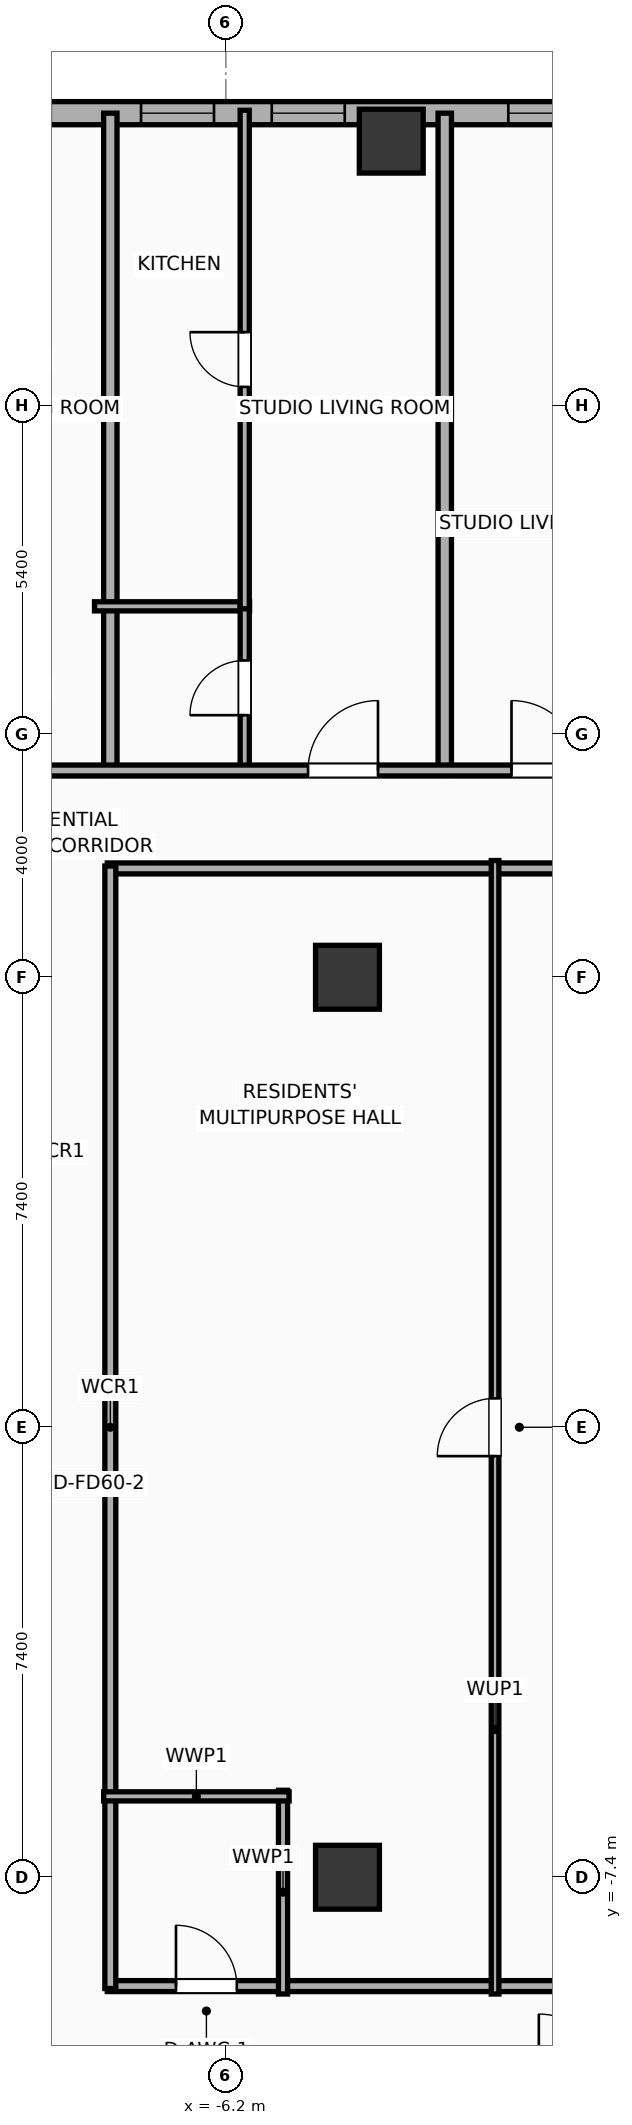
"""IFC4 building model, lengths in metres.
Left out: names, types, materials, properties, quantities, classifications, styles, units other than length and angle.
Written with IfcOpenShell. Run it as: python <this file> out.ifc"""

import sys

from ifc_helpers import new_model, si_unit, direction, frame, frame_2d, origin, origin_2d, place, context, subcontext, project, spatial, rectangle, hollow_rectangle, extrude, element, fill, save


model = new_model("IFC4")
c1 = context("Model", 3, precision=1e-05, world=origin(), true_north=direction((0.0, 1.0)))
c2 = subcontext(c1, "Body", "Model", "MODEL_VIEW")
j1 = project(units=[si_unit("LENGTHUNIT", "METRE"), si_unit("PLANEANGLEUNIT", "RADIAN")], contexts=[c1])
p1 = place(None, origin())
s1 = spatial("IfcSite", under=j1, at=p1, CompositionType="ELEMENT")
p2 = place(p1, origin())
s2 = spatial("IfcBuilding", under=s1, at=p2, CompositionType="ELEMENT")
p3 = place(p2, frame((0.0, 0.0, 109.2)))
s3 = spatial("IfcBuildingStorey", under=s2, at=p3, CompositionType="ELEMENT", Elevation=109.2)
for number, where, z_axis, x_axis in (
    (1, (-4.2, -7.4, 0.0), (0.0, 0.0, 1.0), (1.0, 0.0, 0.0)),
    (2, (-4.2, 7.4, 0.0), (0.0, 0.0, 1.0), (1.0, 0.0, 0.0)),
):
    element("IfcColumn", number, at=place(p3, frame(where, z_axis=z_axis, x_axis=x_axis)), inside=s3, PredefinedType="COLUMN", context=c2, shape_type="SweptSolid", body=[
        extrude(rectangle(XDim=1.05, YDim=1.05, at=origin_2d()), origin(), (0.0, 0.0, 1.0), 3.9),
    ])
p4 = place(p3, frame((-3.48, 21.15, 0.0), z_axis=(0.0, 0.0, 1.0), x_axis=(1.0, 0.0, 0.0)))
e3 = element("IfcColumn", 3, at=p4, inside=s3, PredefinedType="COLUMN", context=c2, shape_type="SweptSolid", body=[
    extrude(hollow_rectangle(XDim=1.05, YDim=1.05, WallThickness=0.036, at=origin_2d()), origin(), (0.0, 0.0, 1.0), 3.9),
])
p5 = place(p3, frame((-25.381, 21.61, 0.0), z_axis=(0.0, 0.0, 1.0), x_axis=(1.0, 0.0, 0.0)))
e4 = element("IfcWall", 4, at=p5, inside=s3, PredefinedType="ELEMENTEDWALL", context=c2, shape_type="SweptSolid", body=[
    extrude(rectangle(XDim=54.763, YDim=0.38, at=frame_2d((27.381, 0.0))), origin(), (0.0, 0.0, 1.0), 3.65),
])
p6 = place(p5, frame((5.645, 0.0, 0.75)))
e5 = element("IfcOpeningElement", 5, at=p6, cuts=e4, PredefinedType="OPENING", context=c2, shape_type="SweptSolid", body=[
    extrude(rectangle(XDim=2.4, YDim=2.1, at=frame_2d((1.2, 1.05))), frame((0.0, 0.2, 0.0), z_axis=(0.0, -1.0, 0.0), x_axis=(1.0, 0.0, 0.0)), (0.0, 0.0, 1.0), 0.4),
])
p7 = place(p5, frame((45.067, 0.0, 0.75)))
e6 = element("IfcOpeningElement", 6, at=p7, cuts=e4, PredefinedType="OPENING", context=c2, shape_type="SweptSolid", body=[
    extrude(rectangle(XDim=2.4, YDim=2.1, at=frame_2d((1.2, 1.05))), frame((0.0, 0.2, 0.0), z_axis=(0.0, -1.0, 0.0), x_axis=(1.0, 0.0, 0.0)), (0.0, 0.0, 1.0), 0.4),
])
p8 = place(p5, frame((1.831, 0.0, 0.75)))
e7 = element("IfcOpeningElement", 7, at=p8, cuts=e4, PredefinedType="OPENING", context=c2, shape_type="SweptSolid", body=[
    extrude(rectangle(XDim=1.2, YDim=2.05, at=frame_2d((0.6, 1.025))), frame((0.0, 0.2, 0.0), z_axis=(0.0, -1.0, 0.0), x_axis=(1.0, 0.0, 0.0)), (0.0, 0.0, 1.0), 0.4),
])
p9 = place(p5, frame((8.996, 0.0, 0.75)))
e8 = element("IfcOpeningElement", 8, at=p9, cuts=e4, PredefinedType="OPENING", context=c2, shape_type="SweptSolid", body=[
    extrude(rectangle(XDim=1.2, YDim=2.05, at=frame_2d((0.6, 1.025))), frame((0.0, 0.2, 0.0), z_axis=(0.0, -1.0, 0.0), x_axis=(1.0, 0.0, 0.0)), (0.0, 0.0, 1.0), 0.4),
])
p10 = place(p5, frame((15.102, 0.0, 0.75)))
e9 = element("IfcOpeningElement", 9, at=p10, cuts=e4, PredefinedType="OPENING", context=c2, shape_type="SweptSolid", body=[
    extrude(rectangle(XDim=1.2, YDim=2.05, at=frame_2d((0.6, 1.025))), frame((0.0, 0.2, 0.0), z_axis=(0.0, -1.0, 0.0), x_axis=(1.0, 0.0, 0.0)), (0.0, 0.0, 1.0), 0.4),
])
p11 = place(p5, frame((12.352, 0.0, 0.75)))
e10 = element("IfcOpeningElement", 10, at=p11, cuts=e4, PredefinedType="OPENING", context=c2, shape_type="SweptSolid", body=[
    extrude(rectangle(XDim=1.2, YDim=2.05, at=frame_2d((0.6, 1.025))), frame((0.0, 0.2, 0.0), z_axis=(0.0, -1.0, 0.0), x_axis=(1.0, 0.0, 0.0)), (0.0, 0.0, 1.0), 0.4),
])
p12 = place(p5, frame((19.936, 0.0, 0.75)))
e11 = element("IfcOpeningElement", 11, at=p12, cuts=e4, PredefinedType="OPENING", context=c2, shape_type="SweptSolid", body=[
    extrude(rectangle(XDim=1.2, YDim=2.05, at=frame_2d((0.6, 1.025))), frame((0.0, 0.2, 0.0), z_axis=(0.0, -1.0, 0.0), x_axis=(1.0, 0.0, 0.0)), (0.0, 0.0, 1.0), 0.4),
])
p13 = place(p5, frame((17.786, 0.0, 0.75)))
e12 = element("IfcOpeningElement", 12, at=p13, cuts=e4, PredefinedType="OPENING", context=c2, shape_type="SweptSolid", body=[
    extrude(rectangle(XDim=1.2, YDim=2.05, at=frame_2d((0.6, 1.025))), frame((0.0, 0.2, 0.0), z_axis=(0.0, -1.0, 0.0), x_axis=(1.0, 0.0, 0.0)), (0.0, 0.0, 1.0), 0.4),
])
p14 = place(p5, frame((23.826, 0.0, 0.75)))
e13 = element("IfcOpeningElement", 13, at=p14, cuts=e4, PredefinedType="OPENING", context=c2, shape_type="SweptSolid", body=[
    extrude(rectangle(XDim=1.2, YDim=2.05, at=frame_2d((0.6, 1.025))), frame((0.0, 0.2, 0.0), z_axis=(0.0, -1.0, 0.0), x_axis=(1.0, 0.0, 0.0)), (0.0, 0.0, 1.0), 0.4),
])
p15 = place(p5, frame((26.576, 0.0, 0.75)))
e14 = element("IfcOpeningElement", 14, at=p15, cuts=e4, PredefinedType="OPENING", context=c2, shape_type="SweptSolid", body=[
    extrude(rectangle(XDim=1.2, YDim=2.05, at=frame_2d((0.6, 1.025))), frame((0.0, 0.2, 0.0), z_axis=(0.0, -1.0, 0.0), x_axis=(1.0, 0.0, 0.0)), (0.0, 0.0, 1.0), 0.4),
])
p16 = place(p5, frame((30.431, 0.0, 0.75)))
e15 = element("IfcOpeningElement", 15, at=p16, cuts=e4, PredefinedType="OPENING", context=c2, shape_type="SweptSolid", body=[
    extrude(rectangle(XDim=1.2, YDim=2.05, at=frame_2d((0.6, 1.025))), frame((0.0, 0.2, 0.0), z_axis=(0.0, -1.0, 0.0), x_axis=(1.0, 0.0, 0.0)), (0.0, 0.0, 1.0), 0.4),
])
p17 = place(p5, frame((38.581, 0.0, 0.75)))
e16 = element("IfcOpeningElement", 16, at=p17, cuts=e4, PredefinedType="OPENING", context=c2, shape_type="SweptSolid", body=[
    extrude(rectangle(XDim=1.2, YDim=2.05, at=frame_2d((0.6, 1.025))), frame((0.0, 0.2, 0.0), z_axis=(0.0, -1.0, 0.0), x_axis=(1.0, 0.0, 0.0)), (0.0, 0.0, 1.0), 0.4),
])
p18 = place(p5, frame((34.786, 0.0, 0.75)))
e17 = element("IfcOpeningElement", 17, at=p18, cuts=e4, PredefinedType="OPENING", context=c2, shape_type="SweptSolid", body=[
    extrude(rectangle(XDim=1.2, YDim=2.05, at=frame_2d((0.6, 1.025))), frame((0.0, 0.2, 0.0), z_axis=(0.0, -1.0, 0.0), x_axis=(1.0, 0.0, 0.0)), (0.0, 0.0, 1.0), 0.4),
])
p19 = place(p5, frame((41.876, 0.0, 0.75)))
e18 = element("IfcOpeningElement", 18, at=p19, cuts=e4, PredefinedType="OPENING", context=c2, shape_type="SweptSolid", body=[
    extrude(rectangle(XDim=1.2, YDim=2.05, at=frame_2d((0.6, 1.025))), frame((0.0, 0.2, 0.0), z_axis=(0.0, -1.0, 0.0), x_axis=(1.0, 0.0, 0.0)), (0.0, 0.0, 1.0), 0.4),
])
p20 = place(p5, frame((49.385, 0.0, 0.75)))
e19 = element("IfcOpeningElement", 19, at=p20, cuts=e4, PredefinedType="OPENING", context=c2, shape_type="SweptSolid", body=[
    extrude(rectangle(XDim=1.2, YDim=2.05, at=frame_2d((0.6, 1.025))), frame((0.0, 0.2, 0.0), z_axis=(0.0, -1.0, 0.0), x_axis=(1.0, 0.0, 0.0)), (0.0, 0.0, 1.0), 0.4),
])
p21 = place(p5, frame((52.181, 0.0, 0.75)))
e20 = element("IfcOpeningElement", 20, at=p21, cuts=e4, PredefinedType="OPENING", context=c2, shape_type="SweptSolid", body=[
    extrude(rectangle(XDim=1.2, YDim=2.05, at=frame_2d((0.6, 1.025))), frame((0.0, 0.2, 0.0), z_axis=(0.0, -1.0, 0.0), x_axis=(1.0, 0.0, 0.0)), (0.0, 0.0, 1.0), 0.4),
])
p22 = place(p3, frame((-8.15, 9.19, 0.0), z_axis=(0.0, 0.0, 1.0), x_axis=(1.0, 0.0, 0.0)))
e21 = element("IfcWall", 21, at=p22, inside=s3, PredefinedType="PARTITIONING", context=c2, shape_type="SweptSolid", body=[
    extrude(rectangle(XDim=16.3, YDim=0.18, at=frame_2d((8.15, 0.0))), origin(), (0.0, 0.0, 1.0), 3.65),
])
p23 = place(p22, frame((8.49, 0.0, 0.0)))
e22 = element("IfcOpeningElement", 22, at=p23, cuts=e21, PredefinedType="OPENING", context=c2, shape_type="SweptSolid", body=[
    extrude(rectangle(XDim=0.95, YDim=2.05, at=frame_2d((0.475, 1.025))), frame((0.0, 0.1, 0.0), z_axis=(0.0, -1.0, 0.0), x_axis=(1.0, 0.0, 0.0)), (0.0, 0.0, 1.0), 0.2),
])
p24 = place(p3, frame((-8.15, -9.19, 0.0), z_axis=(0.0, 0.0, 1.0), x_axis=(1.0, 0.0, 0.0)))
e23 = element("IfcWall", 23, at=p24, inside=s3, PredefinedType="PARTITIONING", context=c2, shape_type="SweptSolid", body=[
    extrude(rectangle(XDim=16.3, YDim=0.18, at=frame_2d((8.15, 0.0))), origin(), (0.0, 0.0, 1.0), 3.65),
])
p25 = place(p24, frame((1.13, 0.0, 0.0)))
e24 = element("IfcOpeningElement", 24, at=p25, cuts=e23, PredefinedType="OPENING", context=c2, shape_type="SweptSolid", body=[
    extrude(rectangle(XDim=1.0, YDim=2.05, at=frame_2d((0.5, 1.025))), frame((0.0, 0.1, 0.0), z_axis=(0.0, -1.0, 0.0), x_axis=(1.0, 0.0, 0.0)), (0.0, 0.0, 1.0), 0.2),
])
p26 = place(p24, frame((10.12, 0.0, 0.0)))
e25 = element("IfcOpeningElement", 25, at=p26, cuts=e23, PredefinedType="OPENING", context=c2, shape_type="SweptSolid", body=[
    extrude(rectangle(XDim=0.95, YDim=2.05, at=frame_2d((0.475, 1.025))), frame((0.0, 0.1, 0.0), z_axis=(0.0, -1.0, 0.0), x_axis=(1.0, 0.0, 0.0)), (0.0, 0.0, 1.0), 0.2),
])
p27 = place(p3, frame((-8.1, -9.23, 0.0), z_axis=(0.0, 0.0, 1.0), x_axis=(0.0, 1.0, 0.0)))
e26 = element("IfcWall", 26, at=p27, inside=s3, PredefinedType="PARTITIONING", context=c2, shape_type="SweptSolid", body=[
    extrude(rectangle(XDim=18.46, YDim=0.18, at=frame_2d((9.23, 0.0))), origin(), (0.0, 0.0, 1.0), 3.65),
])
p28 = place(p3, frame((-5.26, -9.32, 0.0), z_axis=(0.0, 0.0, 1.0), x_axis=(0.0, 1.0, 0.0)))
e27 = element("IfcWall", 27, at=p28, inside=s3, PredefinedType="PLUMBINGWALL", context=c2, shape_type="SweptSolid", body=[
    extrude(rectangle(XDim=3.35, YDim=0.15, at=frame_2d((1.675, 0.0))), origin(), (0.0, 0.0, 1.0), 3.65),
])
p29 = place(p3, frame((-8.21, -6.07, 0.0), z_axis=(0.0, 0.0, 1.0), x_axis=(1.0, 0.0, 0.0)))
e28 = element("IfcWall", 28, at=p29, inside=s3, PredefinedType="PLUMBINGWALL", context=c2, shape_type="SweptSolid", body=[
    extrude(rectangle(XDim=3.05, YDim=0.15, at=frame_2d((1.525, 0.0))), origin(), (0.0, 0.0, 1.0), 3.65),
])
p30 = place(p3, frame((-1.773, -9.32, 0.0), z_axis=(0.0, 0.0, 1.0), x_axis=(0.0, 1.0, 0.0)))
e29 = element("IfcWall", 29, at=p30, inside=s3, PredefinedType="PARTITIONING", context=c2, shape_type="SweptSolid", body=[
    extrude(rectangle(XDim=18.64, YDim=0.125, at=frame_2d((9.32, 0.0))), origin(), (0.0, 0.0, 1.0), 3.65),
])
p31 = place(p30, frame((8.845, 0.0, 0.0)))
e30 = element("IfcOpeningElement", 30, at=p31, cuts=e29, PredefinedType="OPENING", context=c2, shape_type="SweptSolid", body=[
    extrude(rectangle(XDim=0.95, YDim=2.05, at=frame_2d((0.475, 1.025))), frame((0.0, 0.073, 0.0), z_axis=(0.0, -1.0, 0.0), x_axis=(1.0, 0.0, 0.0)), (0.0, 0.0, 1.0), 0.145),
])
p32 = place(p3, frame((-8.1, 10.72, 0.0), z_axis=(0.0, 0.0, 1.0), x_axis=(0.0, 1.0, 0.0)))
e31 = element("IfcWall", 31, at=p32, inside=s3, PredefinedType="PARTITIONING", context=c2, shape_type="SweptSolid", body=[
    extrude(rectangle(XDim=10.89, YDim=0.22, at=frame_2d((5.445, 0.0))), origin(), (0.0, 0.0, 1.0), 3.65),
])
p33 = place(p3, frame((-8.36, 13.5, 0.0), z_axis=(0.0, 0.0, 1.0), x_axis=(1.0, 0.0, 0.0)))
e32 = element("IfcWall", 32, at=p33, inside=s3, PredefinedType="PLUMBINGWALL", context=c2, shape_type="SweptSolid", body=[
    extrude(rectangle(XDim=2.55, YDim=0.15, at=frame_2d((1.275, 0.0))), origin(), (0.0, 0.0, 1.0), 3.65),
])
p34 = place(p3, frame((-5.89, 10.78, 0.0), z_axis=(0.0, 0.0, 1.0), x_axis=(0.0, 1.0, 0.0)))
e33 = element("IfcWall", 33, at=p34, inside=s3, PredefinedType="PLUMBINGWALL", context=c2, shape_type="SweptSolid", body=[
    extrude(rectangle(XDim=2.76, YDim=0.15, at=frame_2d((1.38, 0.0))), origin(), (0.0, 0.0, 1.0), 3.65),
])
p35 = place(p34, frame((0.93, 0.0, 0.0)))
e34 = element("IfcOpeningElement", 34, at=p35, cuts=e33, PredefinedType="OPENING", context=c2, shape_type="SweptSolid", body=[
    extrude(rectangle(XDim=0.9, YDim=2.05, at=frame_2d((0.45, 1.025))), frame((0.0, 0.085, 0.0), z_axis=(0.0, -1.0, 0.0), x_axis=(1.0, 0.0, 0.0)), (0.0, 0.0, 1.0), 0.17),
])
p36 = place(p3, frame((-5.89, 13.46, 0.0), z_axis=(0.0, 0.0, 1.0), x_axis=(0.0, 1.0, 0.0)))
e35 = element("IfcWall", 35, at=p36, inside=s3, PredefinedType="PLUMBINGWALL", context=c2, shape_type="SweptSolid", body=[
    extrude(rectangle(XDim=8.198, YDim=0.15, at=frame_2d((4.099, 0.0))), origin(), (0.0, 0.0, 1.0), 3.65),
])
p37 = place(p36, frame((3.649, 0.0, 0.0)))
e36 = element("IfcOpeningElement", 36, at=p37, cuts=e35, PredefinedType="OPENING", context=c2, shape_type="SweptSolid", body=[
    extrude(rectangle(XDim=0.9, YDim=2.05, at=frame_2d((0.45, 1.025))), frame((0.0, 0.085, 0.0), z_axis=(0.0, -1.0, 0.0), x_axis=(1.0, 0.0, 0.0)), (0.0, 0.0, 1.0), 0.17),
])
p38 = place(p3, frame((-2.6, 10.72, 0.0), z_axis=(0.0, 0.0, 1.0), x_axis=(0.0, 1.0, 0.0)))
e37 = element("IfcWall", 37, at=p38, inside=s3, PredefinedType="PARTITIONING", context=c2, shape_type="SweptSolid", body=[
    extrude(rectangle(XDim=10.89, YDim=0.22, at=frame_2d((5.445, 0.0))), origin(), (0.0, 0.0, 1.0), 3.65),
])
p39 = place(p3, frame((-29.21, 10.8, 0.0), z_axis=(0.0, 0.0, 1.0), x_axis=(1.0, 0.0, 0.0)))
e38 = element("IfcWall", 38, at=p39, inside=s3, PredefinedType="PARTITIONING", context=c2, shape_type="SweptSolid", body=[
    extrude(rectangle(XDim=62.42, YDim=0.18, at=frame_2d((31.21, 0.0))), origin(), (0.0, 0.0, 1.0), 3.65),
])
p40 = place(p39, frame((3.457, 0.0, 0.0)))
e39 = element("IfcOpeningElement", 39, at=p40, cuts=e38, PredefinedType="OPENING", context=c2, shape_type="SweptSolid", body=[
    extrude(rectangle(XDim=1.15, YDim=2.05, at=frame_2d((0.575, 1.025))), frame((0.0, 0.1, 0.0), z_axis=(0.0, -1.0, 0.0), x_axis=(1.0, 0.0, 0.0)), (0.0, 0.0, 1.0), 0.2),
])
p41 = place(p39, frame((11.297, 0.0, 0.0)))
e40 = element("IfcOpeningElement", 40, at=p41, cuts=e38, PredefinedType="OPENING", context=c2, shape_type="SweptSolid", body=[
    extrude(rectangle(XDim=1.15, YDim=2.05, at=frame_2d((0.575, 1.025))), frame((0.0, 0.1, 0.0), z_axis=(0.0, -1.0, 0.0), x_axis=(1.0, 0.0, 0.0)), (0.0, 0.0, 1.0), 0.2),
])
p42 = place(p39, frame((18.925, 0.0, 0.0)))
e41 = element("IfcOpeningElement", 41, at=p42, cuts=e38, PredefinedType="OPENING", context=c2, shape_type="SweptSolid", body=[
    extrude(rectangle(XDim=1.15, YDim=2.05, at=frame_2d((0.575, 1.025))), frame((0.0, 0.1, 0.0), z_axis=(0.0, -1.0, 0.0), x_axis=(1.0, 0.0, 0.0)), (0.0, 0.0, 1.0), 0.2),
])
p43 = place(p39, frame((24.362, 0.0, 0.0)))
e42 = element("IfcOpeningElement", 42, at=p43, cuts=e38, PredefinedType="OPENING", context=c2, shape_type="SweptSolid", body=[
    extrude(rectangle(XDim=1.15, YDim=2.05, at=frame_2d((0.575, 1.025))), frame((0.0, 0.1, 0.0), z_axis=(0.0, -1.0, 0.0), x_axis=(1.0, 0.0, 0.0)), (0.0, 0.0, 1.0), 0.2),
])
p44 = place(p39, frame((27.708, 0.0, 0.0)))
e43 = element("IfcOpeningElement", 43, at=p44, cuts=e38, PredefinedType="OPENING", context=c2, shape_type="SweptSolid", body=[
    extrude(rectangle(XDim=1.15, YDim=2.05, at=frame_2d((0.575, 1.025))), frame((0.0, 0.1, 0.0), z_axis=(0.0, -1.0, 0.0), x_axis=(1.0, 0.0, 0.0)), (0.0, 0.0, 1.0), 0.2),
])
p45 = place(p39, frame((34.618, 0.0, 0.0)))
e44 = element("IfcOpeningElement", 44, at=p45, cuts=e38, PredefinedType="OPENING", context=c2, shape_type="SweptSolid", body=[
    extrude(rectangle(XDim=0.9, YDim=2.05, at=frame_2d((0.45, 1.025))), frame((0.0, 0.1, 0.0), z_axis=(0.0, -1.0, 0.0), x_axis=(1.0, 0.0, 0.0)), (0.0, 0.0, 1.0), 0.2),
])
p46 = place(p39, frame((43.106, 0.0, 0.0)))
e45 = element("IfcOpeningElement", 45, at=p46, cuts=e38, PredefinedType="OPENING", context=c2, shape_type="SweptSolid", body=[
    extrude(rectangle(XDim=1.15, YDim=2.05, at=frame_2d((0.575, 1.025))), frame((0.0, 0.1, 0.0), z_axis=(0.0, -1.0, 0.0), x_axis=(1.0, 0.0, 0.0)), (0.0, 0.0, 1.0), 0.2),
])
p47 = place(p39, frame((51.777, 0.0, 0.0)))
e46 = element("IfcOpeningElement", 46, at=p47, cuts=e38, PredefinedType="OPENING", context=c2, shape_type="SweptSolid", body=[
    extrude(rectangle(XDim=0.9, YDim=2.05, at=frame_2d((0.45, 1.025))), frame((0.0, 0.1, 0.0), z_axis=(0.0, -1.0, 0.0), x_axis=(1.0, 0.0, 0.0)), (0.0, 0.0, 1.0), 0.2),
])
p48 = place(p39, frame((58.718, 0.0, 0.0)))
e47 = element("IfcOpeningElement", 47, at=p48, cuts=e38, PredefinedType="OPENING", context=c2, shape_type="SweptSolid", body=[
    extrude(rectangle(XDim=0.9, YDim=2.05, at=frame_2d((0.45, 1.025))), frame((0.0, 0.1, 0.0), z_axis=(0.0, -1.0, 0.0), x_axis=(1.0, 0.0, 0.0)), (0.0, 0.0, 1.0), 0.2),
])
p49 = place(p12, origin())
e48 = element("IfcWindow", 48, at=p49, inside=s3, PartitioningType="SINGLE_PANEL", PredefinedType="WINDOW", context=c2, shape_type="SweptSolid", body=[
    extrude(rectangle(XDim=1.2, YDim=2.05, at=frame_2d((0.6, 1.025))), frame((0.0, 0.03, 0.0), z_axis=(0.0, -1.0, 0.0), x_axis=(1.0, 0.0, 0.0)), (0.0, 0.0, 1.0), 0.06),
])
fill(e11, e48)
p50 = place(p13, origin())
e49 = element("IfcWindow", 49, at=p50, inside=s3, PartitioningType="SINGLE_PANEL", PredefinedType="WINDOW", context=c2, shape_type="SweptSolid", body=[
    extrude(rectangle(XDim=1.2, YDim=2.05, at=frame_2d((0.6, 1.025))), frame((0.0, 0.03, 0.0), z_axis=(0.0, -1.0, 0.0), x_axis=(1.0, 0.0, 0.0)), (0.0, 0.0, 1.0), 0.06),
])
fill(e12, e49)
p51 = place(p14, origin())
e50 = element("IfcWindow", 50, at=p51, inside=s3, PartitioningType="SINGLE_PANEL", PredefinedType="WINDOW", context=c2, shape_type="SweptSolid", body=[
    extrude(rectangle(XDim=1.2, YDim=2.05, at=frame_2d((0.6, 1.025))), frame((0.0, 0.03, 0.0), z_axis=(0.0, -1.0, 0.0), x_axis=(1.0, 0.0, 0.0)), (0.0, 0.0, 1.0), 0.06),
])
fill(e13, e50)
p52 = place(p25, origin())
e51 = element("IfcDoor", 51, at=p52, inside=s3, OperationType="SINGLE_SWING_LEFT", PredefinedType="DOOR", context=c2, shape_type="SweptSolid", body=[
    extrude(rectangle(XDim=1.0, YDim=2.05, at=frame_2d((0.5, 1.025))), frame((0.0, 0.025, 0.0), z_axis=(0.0, -1.0, 0.0), x_axis=(1.0, 0.0, 0.0)), (0.0, 0.0, 1.0), 0.05),
])
fill(e24, e51)
p53 = place(p31, origin())
e52 = element("IfcDoor", 52, at=p53, inside=s3, OperationType="SINGLE_SWING_LEFT", PredefinedType="DOOR", context=c2, shape_type="SweptSolid", body=[
    extrude(rectangle(XDim=0.95, YDim=2.05, at=frame_2d((0.475, 1.025))), frame((0.0, 0.025, 0.0), z_axis=(0.0, -1.0, 0.0), x_axis=(1.0, 0.0, 0.0)), (0.0, 0.0, 1.0), 0.05),
])
fill(e30, e52)
p54 = place(p35, origin())
e53 = element("IfcDoor", 53, at=p54, inside=s3, OperationType="SINGLE_SWING_LEFT", PredefinedType="DOOR", context=c2, shape_type="SweptSolid", body=[
    extrude(rectangle(XDim=0.9, YDim=2.05, at=frame_2d((0.45, 1.025))), frame((0.0, 0.025, 0.0), z_axis=(0.0, -1.0, 0.0), x_axis=(1.0, 0.0, 0.0)), (0.0, 0.0, 1.0), 0.05),
])
fill(e34, e53)
p55 = place(p37, origin())
e54 = element("IfcDoor", 54, at=p55, inside=s3, OperationType="SINGLE_SWING_RIGHT", PredefinedType="DOOR", context=c2, shape_type="SweptSolid", body=[
    extrude(rectangle(XDim=0.9, YDim=2.05, at=frame_2d((0.45, 1.025))), frame((0.0, 0.025, 0.0), z_axis=(0.0, -1.0, 0.0), x_axis=(1.0, 0.0, 0.0)), (0.0, 0.0, 1.0), 0.05),
])
fill(e36, e54)
p56 = place(p43, origin())
e55 = element("IfcDoor", 55, at=p56, inside=s3, OperationType="SINGLE_SWING_RIGHT", PredefinedType="DOOR", context=c2, shape_type="SweptSolid", body=[
    extrude(rectangle(XDim=1.15, YDim=2.05, at=frame_2d((0.575, 1.025))), frame((0.0, 0.025, 0.0), z_axis=(0.0, -1.0, 0.0), x_axis=(1.0, 0.0, 0.0)), (0.0, 0.0, 1.0), 0.05),
])
fill(e42, e55)
p57 = place(p44, origin())
e56 = element("IfcDoor", 56, at=p57, inside=s3, OperationType="SINGLE_SWING_LEFT", PredefinedType="DOOR", context=c2, shape_type="SweptSolid", body=[
    extrude(rectangle(XDim=1.15, YDim=2.05, at=frame_2d((0.575, 1.025))), frame((0.0, 0.025, 0.0), z_axis=(0.0, -1.0, 0.0), x_axis=(1.0, 0.0, 0.0)), (0.0, 0.0, 1.0), 0.05),
])
fill(e43, e56)
save(model, sys.argv[1])
